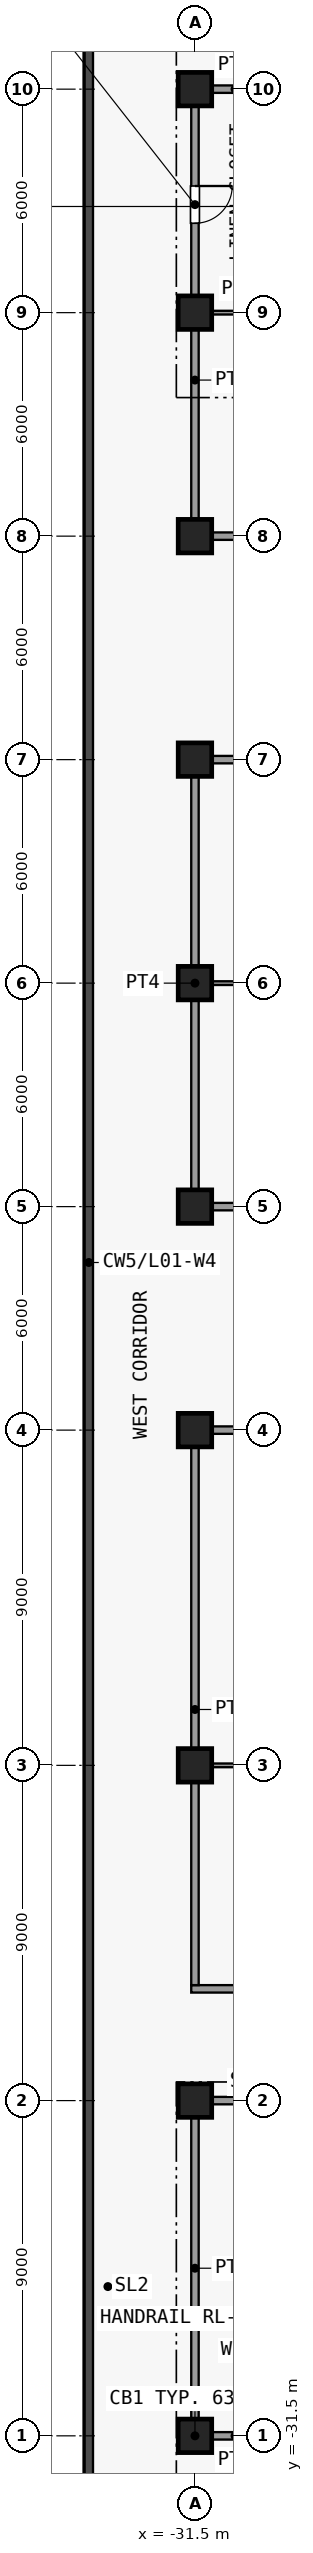
"""IFC4 building model, lengths in metres.
Left out: names, types, materials, properties, quantities, classifications, styles, units other than length and angle.
Written with IfcOpenShell. Run it as: python <this file> out.ifc"""

import sys

from ifc_helpers import new_model, si_unit, direction, frame, frame_2d, origin, origin_2d, place, context, subcontext, project, spatial, rectangle, extrude, element, fill, save


model = new_model("IFC4")
c1 = context("Model", 3, precision=1e-05, world=origin(), true_north=direction((0.0, 1.0)))
c2 = subcontext(c1, "Body", "Model", "MODEL_VIEW")
j1 = project(units=[si_unit("LENGTHUNIT", "METRE"), si_unit("PLANEANGLEUNIT", "RADIAN")], contexts=[c1])
p1 = place(None, origin())
s1 = spatial("IfcSite", under=j1, at=p1, CompositionType="ELEMENT")
p2 = place(p1, origin())
s2 = spatial("IfcBuilding", under=s1, at=p2, CompositionType="ELEMENT")
p3 = place(p2, frame((0.0, 0.0, 8.0)))
s3 = spatial("IfcBuildingStorey", under=s2, at=p3, CompositionType="ELEMENT", Elevation=8.0)
for number, where, z_axis, x_axis in (
    (1, (-31.5, -31.5, 0.0), (0.0, 0.0, 1.0), (1.0, 0.0, 0.0)),
    (2, (-31.5, -22.5, 0.0), (0.0, 0.0, 1.0), (1.0, 0.0, 0.0)),
    (3, (-31.5, -13.5, 0.0), (0.0, 0.0, 1.0), (1.0, 0.0, 0.0)),
    (4, (-31.5, -4.5, 0.0), (0.0, 0.0, 1.0), (1.0, 0.0, 0.0)),
    (5, (-31.5, 1.5, 0.0), (0.0, 0.0, 1.0), (1.0, 0.0, 0.0)),
    (6, (-31.5, 7.5, 0.0), (0.0, 0.0, 1.0), (1.0, 0.0, 0.0)),
    (7, (-31.5, 13.5, 0.0), (0.0, 0.0, 1.0), (1.0, 0.0, 0.0)),
    (8, (-31.5, 19.5, 0.0), (0.0, 0.0, 1.0), (1.0, 0.0, 0.0)),
    (9, (-31.5, 25.5, 0.0), (0.0, 0.0, 1.0), (1.0, 0.0, 0.0)),
    (10, (-31.5, 31.5, 0.0), (0.0, 0.0, 1.0), (1.0, 0.0, 0.0)),
):
    element("IfcColumn", number, at=place(p3, frame(where, z_axis=z_axis, x_axis=x_axis)), inside=s3, PredefinedType="COLUMN", context=c2, shape_type="SweptSolid", body=[
        extrude(rectangle(XDim=0.9, YDim=0.9, at=origin_2d()), origin(), (0.0, 0.0, 1.0), 5.5),
    ])
p4 = place(p3, frame((-31.6, -31.5, 0.0), z_axis=(0.0, 0.0, 1.0), x_axis=(1.0, 0.0, 0.0)))
e11 = element("IfcWall", 11, at=p4, inside=s3, PredefinedType="PARTITIONING", context=c2, shape_type="SweptSolid", body=[
    extrude(rectangle(XDim=2.35, YDim=0.2, at=frame_2d((1.175, 0.0))), origin(), (0.0, 0.0, 1.0), 5.15),
])
p5 = place(p3, frame((-31.6, -22.5, 0.0), z_axis=(0.0, 0.0, 1.0), x_axis=(1.0, 0.0, 0.0)))
e12 = element("IfcWall", 12, at=p5, inside=s3, PredefinedType="PARTITIONING", context=c2, shape_type="SweptSolid", body=[
    extrude(rectangle(XDim=14.2, YDim=0.2, at=frame_2d((7.1, 0.0))), origin(), (0.0, 0.0, 1.0), 5.15),
])
p6 = place(p3, frame((-31.6, -19.5, 0.0), z_axis=(0.0, 0.0, 1.0), x_axis=(1.0, 0.0, 0.0)))
e13 = element("IfcWall", 13, at=p6, inside=s3, PredefinedType="PARTITIONING", context=c2, shape_type="SweptSolid", body=[
    extrude(rectangle(XDim=18.1, YDim=0.2, at=frame_2d((9.05, 0.0))), origin(), (0.0, 0.0, 1.0), 5.15),
])
p7 = place(p6, frame((2.8, 0.0, 0.0)))
e14 = element("IfcOpeningElement", 14, at=p7, cuts=e13, PredefinedType="OPENING", context=c2, shape_type="SweptSolid", body=[
    extrude(rectangle(XDim=1.8, YDim=2.1, at=frame_2d((0.9, 1.05))), frame((0.0, 0.11, 0.0), z_axis=(0.0, -1.0, 0.0), x_axis=(1.0, 0.0, 0.0)), (0.0, 0.0, 1.0), 0.22),
])
p8 = place(p6, frame((13.6, 0.0, 0.0)))
e15 = element("IfcOpeningElement", 15, at=p8, cuts=e13, PredefinedType="OPENING", context=c2, shape_type="SweptSolid", body=[
    extrude(rectangle(XDim=1.8, YDim=2.1, at=frame_2d((0.9, 1.05))), frame((0.0, 0.11, 0.0), z_axis=(0.0, -1.0, 0.0), x_axis=(1.0, 0.0, 0.0)), (0.0, 0.0, 1.0), 0.22),
])
p9 = place(p3, frame((-31.4, -13.5, 0.0), z_axis=(0.0, 0.0, 1.0), x_axis=(1.0, 0.0, 0.0)))
e16 = element("IfcWall", 16, at=p9, inside=s3, PredefinedType="PARTITIONING", context=c2, shape_type="SweptSolid", body=[
    extrude(rectangle(XDim=17.9, YDim=0.1, at=frame_2d((8.95, 0.0))), origin(), (0.0, 0.0, 1.0), 5.15),
])
p10 = place(p3, frame((-31.6, -4.5, 0.0), z_axis=(0.0, 0.0, 1.0), x_axis=(1.0, 0.0, 0.0)))
e17 = element("IfcWall", 17, at=p10, inside=s3, PredefinedType="PARTITIONING", context=c2, shape_type="SweptSolid", body=[
    extrude(rectangle(XDim=18.2, YDim=0.2, at=frame_2d((9.1, 0.0))), origin(), (0.0, 0.0, 1.0), 5.15),
])
p11 = place(p10, frame((3.2, 0.0, 0.0)))
e18 = element("IfcOpeningElement", 18, at=p11, cuts=e17, PredefinedType="OPENING", context=c2, shape_type="SweptSolid", body=[
    extrude(rectangle(XDim=1.0, YDim=2.1, at=frame_2d((0.5, 1.05))), frame((0.0, 0.11, 0.0), z_axis=(0.0, -1.0, 0.0), x_axis=(1.0, 0.0, 0.0)), (0.0, 0.0, 1.0), 0.22),
])
p12 = place(p10, frame((13.2, 0.0, 0.0)))
e19 = element("IfcOpeningElement", 19, at=p12, cuts=e17, PredefinedType="OPENING", context=c2, shape_type="SweptSolid", body=[
    extrude(rectangle(XDim=1.0, YDim=2.1, at=frame_2d((0.5, 1.05))), frame((0.0, 0.11, 0.0), z_axis=(0.0, -1.0, 0.0), x_axis=(1.0, 0.0, 0.0)), (0.0, 0.0, 1.0), 0.22),
])
p13 = place(p3, frame((-31.6, 1.5, 0.0), z_axis=(0.0, 0.0, 1.0), x_axis=(1.0, 0.0, 0.0)))
e20 = element("IfcWall", 20, at=p13, inside=s3, PredefinedType="PARTITIONING", context=c2, shape_type="SweptSolid", body=[
    extrude(rectangle(XDim=11.3, YDim=0.2, at=frame_2d((5.65, 0.0))), origin(), (0.0, 0.0, 1.0), 5.15),
])
p14 = place(p13, frame((5.1, 0.0, 0.0)))
e21 = element("IfcOpeningElement", 21, at=p14, cuts=e20, PredefinedType="OPENING", context=c2, shape_type="SweptSolid", body=[
    extrude(rectangle(XDim=1.0, YDim=2.1, at=frame_2d((0.5, 1.05))), frame((0.0, 0.11, 0.0), z_axis=(0.0, -1.0, 0.0), x_axis=(1.0, 0.0, 0.0)), (0.0, 0.0, 1.0), 0.22),
])
p15 = place(p3, frame((-31.4, 7.5, 0.0), z_axis=(0.0, 0.0, 1.0), x_axis=(1.0, 0.0, 0.0)))
e22 = element("IfcWall", 22, at=p15, inside=s3, PredefinedType="PARTITIONING", context=c2, shape_type="SweptSolid", body=[
    extrude(rectangle(XDim=10.9, YDim=0.1, at=frame_2d((5.45, 0.0))), origin(), (0.0, 0.0, 1.0), 5.15),
])
p16 = place(p3, frame((-31.6, 13.5, 0.0), z_axis=(0.0, 0.0, 1.0), x_axis=(1.0, 0.0, 0.0)))
e23 = element("IfcWall", 23, at=p16, inside=s3, PredefinedType="PARTITIONING", context=c2, shape_type="SweptSolid", body=[
    extrude(rectangle(XDim=11.3, YDim=0.2, at=frame_2d((5.65, 0.0))), origin(), (0.0, 0.0, 1.0), 5.15),
])
p17 = place(p16, frame((5.1, 0.0, 0.0)))
e24 = element("IfcOpeningElement", 24, at=p17, cuts=e23, PredefinedType="OPENING", context=c2, shape_type="SweptSolid", body=[
    extrude(rectangle(XDim=1.0, YDim=2.1, at=frame_2d((0.5, 1.05))), frame((0.0, 0.11, 0.0), z_axis=(0.0, -1.0, 0.0), x_axis=(1.0, 0.0, 0.0)), (0.0, 0.0, 1.0), 0.22),
])
p18 = place(p3, frame((-31.6, 19.5, 0.0), z_axis=(0.0, 0.0, 1.0), x_axis=(1.0, 0.0, 0.0)))
e25 = element("IfcWall", 25, at=p18, inside=s3, PredefinedType="PARTITIONING", context=c2, shape_type="SweptSolid", body=[
    extrude(rectangle(XDim=60.1, YDim=0.2, at=frame_2d((30.05, 0.0))), origin(), (0.0, 0.0, 1.0), 5.15),
])
p19 = place(p18, frame((10.0, 0.0, 0.0)))
e26 = element("IfcOpeningElement", 26, at=p19, cuts=e25, PredefinedType="OPENING", context=c2, shape_type="SweptSolid", body=[
    extrude(rectangle(XDim=1.0, YDim=2.1, at=frame_2d((0.5, 1.05))), frame((0.0, 0.11, 0.0), z_axis=(0.0, -1.0, 0.0), x_axis=(1.0, 0.0, 0.0)), (0.0, 0.0, 1.0), 0.22),
])
p20 = place(p18, frame((37.0, 0.0, 0.0)))
e27 = element("IfcOpeningElement", 27, at=p20, cuts=e25, PredefinedType="OPENING", context=c2, shape_type="SweptSolid", body=[
    extrude(rectangle(XDim=1.0, YDim=2.1, at=frame_2d((0.5, 1.05))), frame((0.0, 0.11, 0.0), z_axis=(0.0, -1.0, 0.0), x_axis=(1.0, 0.0, 0.0)), (0.0, 0.0, 1.0), 0.22),
])
p21 = place(p18, frame((49.0, 0.0, 0.0)))
e28 = element("IfcOpeningElement", 28, at=p21, cuts=e25, PredefinedType="OPENING", context=c2, shape_type="SweptSolid", body=[
    extrude(rectangle(XDim=1.0, YDim=2.1, at=frame_2d((0.5, 1.05))), frame((0.0, 0.11, 0.0), z_axis=(0.0, -1.0, 0.0), x_axis=(1.0, 0.0, 0.0)), (0.0, 0.0, 1.0), 0.22),
])
p22 = place(p18, frame((56.9, 0.0, 0.0)))
e29 = element("IfcOpeningElement", 29, at=p22, cuts=e25, PredefinedType="OPENING", context=c2, shape_type="SweptSolid", body=[
    extrude(rectangle(XDim=1.0, YDim=2.1, at=frame_2d((0.5, 1.05))), frame((0.0, 0.11, 0.0), z_axis=(0.0, -1.0, 0.0), x_axis=(1.0, 0.0, 0.0)), (0.0, 0.0, 1.0), 0.22),
])
p23 = place(p3, frame((-31.4, 25.5, 0.0), z_axis=(0.0, 0.0, 1.0), x_axis=(1.0, 0.0, 0.0)))
e30 = element("IfcWall", 30, at=p23, inside=s3, PredefinedType="PARTITIONING", context=c2, shape_type="SweptSolid", body=[
    extrude(rectangle(XDim=2.15, YDim=0.1, at=frame_2d((1.075, 0.0))), origin(), (0.0, 0.0, 1.0), 5.15),
])
p24 = place(p3, frame((-31.6, 31.5, 0.0), z_axis=(0.0, 0.0, 1.0), x_axis=(1.0, 0.0, 0.0)))
e31 = element("IfcWall", 31, at=p24, inside=s3, PredefinedType="PARTITIONING", context=c2, shape_type="SweptSolid", body=[
    extrude(rectangle(XDim=2.35, YDim=0.2, at=frame_2d((1.175, 0.0))), origin(), (0.0, 0.0, 1.0), 5.15),
])
p25 = place(p3, frame((-31.5, -31.4, 0.0), z_axis=(0.0, 0.0, 1.0), x_axis=(0.0, 1.0, 0.0)))
e32 = element("IfcWall", 32, at=p25, inside=s3, PredefinedType="PARTITIONING", context=c2, shape_type="SweptSolid", body=[
    extrude(rectangle(XDim=8.8, YDim=0.2, at=frame_2d((4.4, 0.0))), origin(), (0.0, 0.0, 1.0), 5.15),
])
p26 = place(p3, frame((-31.5, -19.4, 0.0), z_axis=(0.0, 0.0, 1.0), x_axis=(0.0, 1.0, 0.0)))
e33 = element("IfcWall", 33, at=p26, inside=s3, PredefinedType="PARTITIONING", context=c2, shape_type="SweptSolid", body=[
    extrude(rectangle(XDim=14.8, YDim=0.2, at=frame_2d((7.4, 0.0))), origin(), (0.0, 0.0, 1.0), 5.15),
])
p27 = place(p3, frame((-31.5, 1.6, 0.0), z_axis=(0.0, 0.0, 1.0), x_axis=(0.0, 1.0, 0.0)))
e34 = element("IfcWall", 34, at=p27, inside=s3, PredefinedType="PARTITIONING", context=c2, shape_type="SweptSolid", body=[
    extrude(rectangle(XDim=11.8, YDim=0.2, at=frame_2d((5.9, 0.0))), origin(), (0.0, 0.0, 1.0), 5.15),
])
p28 = place(p3, frame((-31.5, 19.6, 0.0), z_axis=(0.0, 0.0, 1.0), x_axis=(0.0, 1.0, 0.0)))
e35 = element("IfcWall", 35, at=p28, inside=s3, PredefinedType="PARTITIONING", context=c2, shape_type="SweptSolid", body=[
    extrude(rectangle(XDim=11.8, YDim=0.2, at=frame_2d((5.9, 0.0))), origin(), (0.0, 0.0, 1.0), 5.15),
])
p29 = place(p28, frame((8.3, 0.0, 0.0)))
e36 = element("IfcOpeningElement", 36, at=p29, cuts=e35, PredefinedType="OPENING", context=c2, shape_type="SweptSolid", body=[
    extrude(rectangle(XDim=1.0, YDim=2.1, at=frame_2d((0.5, 1.05))), frame((0.0, 0.11, 0.0), z_axis=(0.0, -1.0, 0.0), x_axis=(1.0, 0.0, 0.0)), (0.0, 0.0, 1.0), 0.22),
])
p30 = place(p29, origin())
e37 = element("IfcDoor", 37, at=p30, inside=s3, OperationType="SINGLE_SWING_RIGHT", PredefinedType="DOOR", context=c2, shape_type="SweptSolid", body=[
    extrude(rectangle(XDim=1.0, YDim=2.1, at=frame_2d((0.5, 1.05))), frame((0.0, 0.025, 0.0), z_axis=(0.0, -1.0, 0.0), x_axis=(1.0, 0.0, 0.0)), (0.0, 0.0, 1.0), 0.05),
])
fill(e36, e37)
save(model, sys.argv[1])
